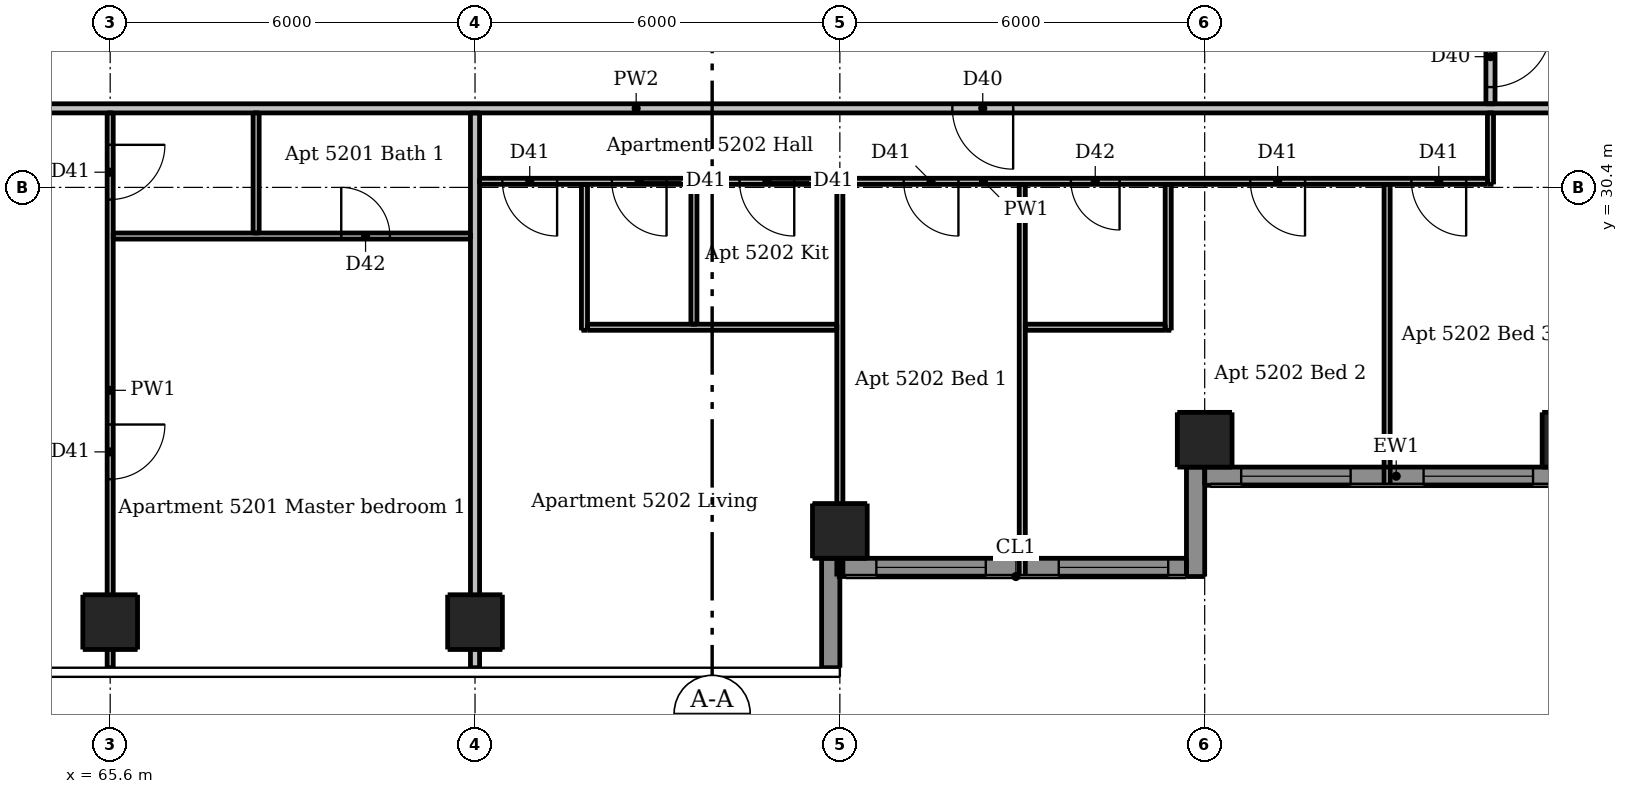
"""IFC4 building model, lengths in metres.
Left out: names, types, materials, properties, quantities, classifications, styles, units other than length and angle.
Written with IfcOpenShell. Run it as: python <this file> out.ifc"""

import sys

from ifc_helpers import new_model, si_unit, direction, frame, frame_2d, origin, origin_2d, place, context, subcontext, project, spatial, rectangle, extrude, element, fill, save


model = new_model("IFC4")
c1 = context("Model", 3, precision=1e-05, world=origin(), true_north=direction((0.0, 1.0)))
c2 = subcontext(c1, "Body", "Model", "MODEL_VIEW")
j1 = project(units=[si_unit("LENGTHUNIT", "METRE"), si_unit("PLANEANGLEUNIT", "RADIAN")], contexts=[c1])
p1 = place(None, origin())
s1 = spatial("IfcSite", under=j1, at=p1, CompositionType="ELEMENT")
p2 = place(p1, origin())
s2 = spatial("IfcBuilding", under=s1, at=p2, CompositionType="ELEMENT")
p3 = place(p2, frame((0.0, 0.0, 196.9)))
s3 = spatial("IfcBuildingStorey", under=s2, at=p3, CompositionType="ELEMENT", Elevation=196.9)
for number, where, z_axis, x_axis in (
    (1, (65.6, 23.25, 0.0), (0.0, 0.0, 1.0), (1.0, 0.0, 0.0)),
    (2, (71.6, 23.25, 0.0), (0.0, 0.0, 1.0), (1.0, 0.0, 0.0)),
    (3, (77.6, 24.75, 0.0), (0.0, 0.0, 1.0), (1.0, 0.0, 0.0)),
    (4, (83.6, 26.25, 0.0), (0.0, 0.0, 1.0), (1.0, 0.0, 0.0)),
    (5, (89.6, 26.25, 0.0), (0.0, 0.0, 1.0), (1.0, 0.0, 0.0)),
):
    element("IfcColumn", number, at=place(p3, frame(where, z_axis=z_axis, x_axis=x_axis)), inside=s3, PredefinedType="COLUMN", context=c2, shape_type="SweptSolid", body=[
        extrude(rectangle(XDim=0.9, YDim=0.9, at=origin_2d()), origin(), (0.0, 0.0, 1.0), 3.05),
    ])
for number, where, z_axis, x_axis in (
    (6, (77.45, 22.5, 0.0), (0.0, 0.0, 1.0), (0.0, 1.0, 0.0)),
    (7, (83.45, 24.0, 0.0), (0.0, 0.0, 1.0), (0.0, 1.0, 0.0)),
):
    element("IfcWall", number, at=place(p3, frame(where, z_axis=z_axis, x_axis=x_axis)), inside=s3, PredefinedType="SOLIDWALL", context=c2, shape_type="SweptSolid", body=[
        extrude(rectangle(XDim=1.8, YDim=0.3, at=frame_2d((0.9, 0.0))), origin(), (0.0, 0.0, 1.0), 3.05),
    ])
p4 = place(p3, frame((77.6, 24.15, 0.0), z_axis=(0.0, 0.0, 1.0), x_axis=(1.0, 0.0, 0.0)))
e8 = element("IfcWall", 8, at=p4, inside=s3, PredefinedType="SOLIDWALL", context=c2, shape_type="SweptSolid", body=[
    extrude(rectangle(XDim=5.7, YDim=0.3, at=frame_2d((2.85, 0.0))), origin(), (0.0, 0.0, 1.0), 3.05),
])
p5 = place(p4, frame((0.6, 0.0, 0.15)))
e9 = element("IfcOpeningElement", 9, at=p5, cuts=e8, PredefinedType="OPENING", context=c2, shape_type="SweptSolid", body=[
    extrude(rectangle(XDim=1.8, YDim=2.1, at=frame_2d((0.9, 1.05))), frame((0.0, 0.16, 0.0), z_axis=(0.0, -1.0, 0.0), x_axis=(1.0, 0.0, 0.0)), (0.0, 0.0, 1.0), 0.32),
])
p6 = place(p4, frame((3.6, 0.0, 0.15)))
e10 = element("IfcOpeningElement", 10, at=p6, cuts=e8, PredefinedType="OPENING", context=c2, shape_type="SweptSolid", body=[
    extrude(rectangle(XDim=1.8, YDim=2.1, at=frame_2d((0.9, 1.05))), frame((0.0, 0.16, 0.0), z_axis=(0.0, -1.0, 0.0), x_axis=(1.0, 0.0, 0.0)), (0.0, 0.0, 1.0), 0.32),
])
p7 = place(p3, frame((83.6, 25.65, 0.0), z_axis=(0.0, 0.0, 1.0), x_axis=(1.0, 0.0, 0.0)))
e11 = element("IfcWall", 11, at=p7, inside=s3, PredefinedType="SOLIDWALL", context=c2, shape_type="SweptSolid", body=[
    extrude(rectangle(XDim=6.3, YDim=0.3, at=frame_2d((3.15, 0.0))), origin(), (0.0, 0.0, 1.0), 3.05),
])
p8 = place(p7, frame((0.6, 0.0, 0.15)))
e12 = element("IfcOpeningElement", 12, at=p8, cuts=e11, PredefinedType="OPENING", context=c2, shape_type="SweptSolid", body=[
    extrude(rectangle(XDim=1.8, YDim=2.1, at=frame_2d((0.9, 1.05))), frame((0.0, 0.16, 0.0), z_axis=(0.0, -1.0, 0.0), x_axis=(1.0, 0.0, 0.0)), (0.0, 0.0, 1.0), 0.32),
])
p9 = place(p7, frame((3.6, 0.0, 0.15)))
e13 = element("IfcOpeningElement", 13, at=p9, cuts=e11, PredefinedType="OPENING", context=c2, shape_type="SweptSolid", body=[
    extrude(rectangle(XDim=1.8, YDim=2.1, at=frame_2d((0.9, 1.05))), frame((0.0, 0.16, 0.0), z_axis=(0.0, -1.0, 0.0), x_axis=(1.0, 0.0, 0.0)), (0.0, 0.0, 1.0), 0.32),
])
p10 = place(p3, frame((65.6, 31.625, 0.0), z_axis=(0.0, 0.0, 1.0), x_axis=(0.0, -1.0, 0.0)))
e14 = element("IfcWall", 14, at=p10, inside=s3, PredefinedType="PARTITIONING", context=c2, shape_type="SweptSolid", body=[
    extrude(rectangle(XDim=9.125, YDim=0.1, at=frame_2d((4.562, 0.0))), origin(), (0.0, 0.0, 1.0), 2.516),
])
p11 = place(p10, frame((0.525, 0.0, 0.0)))
e15 = element("IfcOpeningElement", 15, at=p11, cuts=e14, PredefinedType="OPENING", context=c2, shape_type="SweptSolid", body=[
    extrude(rectangle(XDim=0.9, YDim=2.1, at=frame_2d((0.45, 1.05))), frame((0.0, 0.06, 0.0), z_axis=(0.0, -1.0, 0.0), x_axis=(1.0, 0.0, 0.0)), (0.0, 0.0, 1.0), 0.12),
])
p12 = place(p10, frame((5.125, 0.0, 0.0)))
e16 = element("IfcOpeningElement", 16, at=p12, cuts=e14, PredefinedType="OPENING", context=c2, shape_type="SweptSolid", body=[
    extrude(rectangle(XDim=0.9, YDim=2.1, at=frame_2d((0.45, 1.05))), frame((0.0, 0.06, 0.0), z_axis=(0.0, -1.0, 0.0), x_axis=(1.0, 0.0, 0.0)), (0.0, 0.0, 1.0), 0.12),
])
p13 = place(p3, frame((68.0, 29.65, 0.0), z_axis=(0.0, 0.0, 1.0), x_axis=(0.0, 1.0, 0.0)))
e17 = element("IfcWall", 17, at=p13, inside=s3, PredefinedType="PARTITIONING", context=c2, shape_type="SweptSolid", body=[
    extrude(rectangle(XDim=1.975, YDim=0.1, at=frame_2d((0.988, 0.0))), origin(), (0.0, 0.0, 1.0), 3.05),
])
p14 = place(p3, frame((73.4, 28.05, 0.0), z_axis=(0.0, 0.0, 1.0), x_axis=(0.0, 1.0, 0.0)))
e18 = element("IfcWall", 18, at=p14, inside=s3, PredefinedType="PARTITIONING", context=c2, shape_type="SweptSolid", body=[
    extrude(rectangle(XDim=2.4, YDim=0.1, at=frame_2d((1.2, 0.0))), origin(), (0.0, 0.0, 1.0), 3.05),
])
p15 = place(p3, frame((75.2, 28.15, 0.0), z_axis=(0.0, 0.0, 1.0), x_axis=(0.0, 1.0, 0.0)))
e19 = element("IfcWall", 19, at=p15, inside=s3, PredefinedType="PARTITIONING", context=c2, shape_type="SweptSolid", body=[
    extrude(rectangle(XDim=2.3, YDim=0.1, at=frame_2d((1.15, 0.0))), origin(), (0.0, 0.0, 1.0), 3.05),
])
p16 = place(p3, frame((77.6, 24.0, 0.0), z_axis=(0.0, 0.0, 1.0), x_axis=(0.0, 1.0, 0.0)))
e20 = element("IfcWall", 20, at=p16, inside=s3, PredefinedType="PARTITIONING", context=c2, shape_type="SweptSolid", body=[
    extrude(rectangle(XDim=6.45, YDim=0.1, at=frame_2d((3.225, 0.0))), origin(), (0.0, 0.0, 1.0), 2.59),
])
p17 = place(p3, frame((80.6, 24.0, 0.0), z_axis=(0.0, 0.0, 1.0), x_axis=(0.0, 1.0, 0.0)))
e21 = element("IfcWall", 21, at=p17, inside=s3, PredefinedType="PARTITIONING", context=c2, shape_type="SweptSolid", body=[
    extrude(rectangle(XDim=6.45, YDim=0.1, at=frame_2d((3.225, 0.0))), origin(), (0.0, 0.0, 1.0), 3.05),
])
p18 = place(p3, frame((83.0, 28.05, 0.0), z_axis=(0.0, 0.0, 1.0), x_axis=(0.0, 1.0, 0.0)))
e22 = element("IfcWall", 22, at=p18, inside=s3, PredefinedType="PARTITIONING", context=c2, shape_type="SweptSolid", body=[
    extrude(rectangle(XDim=2.4, YDim=0.1, at=frame_2d((1.2, 0.0))), origin(), (0.0, 0.0, 1.0), 3.05),
])
p19 = place(p3, frame((86.6, 25.5, 0.0), z_axis=(0.0, 0.0, 1.0), x_axis=(0.0, 1.0, 0.0)))
e23 = element("IfcWall", 23, at=p19, inside=s3, PredefinedType="PARTITIONING", context=c2, shape_type="SweptSolid", body=[
    extrude(rectangle(XDim=4.95, YDim=0.1, at=frame_2d((2.475, 0.0))), origin(), (0.0, 0.0, 1.0), 3.05),
])
p20 = place(p3, frame((88.3, 30.45, 0.0), z_axis=(0.0, 0.0, 1.0), x_axis=(0.0, 1.0, 0.0)))
e24 = element("IfcWall", 24, at=p20, inside=s3, PredefinedType="PARTITIONING", context=c2, shape_type="SweptSolid", body=[
    extrude(rectangle(XDim=1.175, YDim=0.1, at=frame_2d((0.587, 0.0))), origin(), (0.0, 0.0, 1.0), 3.05),
])
p21 = place(p3, frame((88.25, 30.5, 0.0), z_axis=(0.0, 0.0, 1.0), x_axis=(-1.0, 0.0, 0.0)))
e25 = element("IfcWall", 25, at=p21, inside=s3, PredefinedType="PARTITIONING", context=c2, shape_type="SweptSolid", body=[
    extrude(rectangle(XDim=16.575, YDim=0.1, at=frame_2d((8.288, 0.0))), origin(), (0.0, 0.0, 1.0), 3.05),
])
p22 = place(p21, frame((15.3, 0.0, 0.0)))
e26 = element("IfcOpeningElement", 26, at=p22, cuts=e25, PredefinedType="OPENING", context=c2, shape_type="SweptSolid", body=[
    extrude(rectangle(XDim=0.9, YDim=2.1, at=frame_2d((0.45, 1.05))), frame((0.0, 0.06, 0.0), z_axis=(0.0, -1.0, 0.0), x_axis=(1.0, 0.0, 0.0)), (0.0, 0.0, 1.0), 0.12),
])
p23 = place(p21, frame((11.4, 0.0, 0.0)))
e27 = element("IfcOpeningElement", 27, at=p23, cuts=e25, PredefinedType="OPENING", context=c2, shape_type="SweptSolid", body=[
    extrude(rectangle(XDim=0.9, YDim=2.1, at=frame_2d((0.45, 1.05))), frame((0.0, 0.06, 0.0), z_axis=(0.0, -1.0, 0.0), x_axis=(1.0, 0.0, 0.0)), (0.0, 0.0, 1.0), 0.12),
])
p24 = place(p21, frame((13.5, 0.0, 0.0)))
e28 = element("IfcOpeningElement", 28, at=p24, cuts=e25, PredefinedType="OPENING", context=c2, shape_type="SweptSolid", body=[
    extrude(rectangle(XDim=0.9, YDim=2.1, at=frame_2d((0.45, 1.05))), frame((0.0, 0.06, 0.0), z_axis=(0.0, -1.0, 0.0), x_axis=(1.0, 0.0, 0.0)), (0.0, 0.0, 1.0), 0.12),
])
p25 = place(p21, frame((8.7, 0.0, 0.0)))
e29 = element("IfcOpeningElement", 29, at=p25, cuts=e25, PredefinedType="OPENING", context=c2, shape_type="SweptSolid", body=[
    extrude(rectangle(XDim=0.9, YDim=2.1, at=frame_2d((0.45, 1.05))), frame((0.0, 0.06, 0.0), z_axis=(0.0, -1.0, 0.0), x_axis=(1.0, 0.0, 0.0)), (0.0, 0.0, 1.0), 0.12),
])
p26 = place(p21, frame((3.0, 0.0, 0.0)))
e30 = element("IfcOpeningElement", 30, at=p26, cuts=e25, PredefinedType="OPENING", context=c2, shape_type="SweptSolid", body=[
    extrude(rectangle(XDim=0.9, YDim=2.1, at=frame_2d((0.45, 1.05))), frame((0.0, 0.06, 0.0), z_axis=(0.0, -1.0, 0.0), x_axis=(1.0, 0.0, 0.0)), (0.0, 0.0, 1.0), 0.12),
])
p27 = place(p21, frame((0.35, 0.0, 0.0)))
e31 = element("IfcOpeningElement", 31, at=p27, cuts=e25, PredefinedType="OPENING", context=c2, shape_type="SweptSolid", body=[
    extrude(rectangle(XDim=0.9, YDim=2.1, at=frame_2d((0.45, 1.05))), frame((0.0, 0.06, 0.0), z_axis=(0.0, -1.0, 0.0), x_axis=(1.0, 0.0, 0.0)), (0.0, 0.0, 1.0), 0.12),
])
p28 = place(p21, frame((6.05, 0.0, 0.0)))
e32 = element("IfcOpeningElement", 32, at=p28, cuts=e25, PredefinedType="OPENING", context=c2, shape_type="SweptSolid", body=[
    extrude(rectangle(XDim=0.8, YDim=2.1, at=frame_2d((0.4, 1.05))), frame((0.0, 0.06, 0.0), z_axis=(0.0, -1.0, 0.0), x_axis=(1.0, 0.0, 0.0)), (0.0, 0.0, 1.0), 0.12),
])
p29 = place(p3, frame((65.65, 29.6, 0.0), z_axis=(0.0, 0.0, 1.0), x_axis=(1.0, 0.0, 0.0)))
e33 = element("IfcWall", 33, at=p29, inside=s3, PredefinedType="PARTITIONING", context=c2, shape_type="SweptSolid", body=[
    extrude(rectangle(XDim=5.875, YDim=0.1, at=frame_2d((2.938, 0.0))), origin(), (0.0, 0.0, 1.0), 3.05),
])
p30 = place(p29, frame((3.75, 0.0, 0.0)))
e34 = element("IfcOpeningElement", 34, at=p30, cuts=e33, PredefinedType="OPENING", context=c2, shape_type="SweptSolid", body=[
    extrude(rectangle(XDim=0.8, YDim=2.1, at=frame_2d((0.4, 1.05))), frame((0.0, 0.06, 0.0), z_axis=(0.0, -1.0, 0.0), x_axis=(1.0, 0.0, 0.0)), (0.0, 0.0, 1.0), 0.12),
])
p31 = place(p3, frame((73.45, 28.1, 0.0), z_axis=(0.0, 0.0, 1.0), x_axis=(1.0, 0.0, 0.0)))
e35 = element("IfcWall", 35, at=p31, inside=s3, PredefinedType="PARTITIONING", context=c2, shape_type="SweptSolid", body=[
    extrude(rectangle(XDim=4.1, YDim=0.1, at=frame_2d((2.05, 0.0))), origin(), (0.0, 0.0, 1.0), 3.05),
])
p32 = place(p3, frame((80.65, 28.1, 0.0), z_axis=(0.0, 0.0, 1.0), x_axis=(1.0, 0.0, 0.0)))
e36 = element("IfcWall", 36, at=p32, inside=s3, PredefinedType="PARTITIONING", context=c2, shape_type="SweptSolid", body=[
    extrude(rectangle(XDim=2.3, YDim=0.1, at=frame_2d((1.15, 0.0))), origin(), (0.0, 0.0, 1.0), 3.05),
])
p33 = place(p3, frame((71.6, 22.5, 0.0), z_axis=(0.0, 0.0, 1.0), x_axis=(0.0, 1.0, 0.0)))
e37 = element("IfcWall", 37, at=p33, inside=s3, PredefinedType="PARTITIONING", context=c2, shape_type="SweptSolid", body=[
    extrude(rectangle(XDim=9.125, YDim=0.15, at=frame_2d((4.562, 0.0))), origin(), (0.0, 0.0, 1.0), 2.516),
])
p34 = place(p3, frame((88.3, 61.175, 0.0), z_axis=(0.0, 0.0, 1.0), x_axis=(0.0, -1.0, 0.0)))
e38 = element("IfcWall", 38, at=p34, inside=s3, PredefinedType="PARTITIONING", context=c2, shape_type="SweptSolid", body=[
    extrude(rectangle(XDim=29.4, YDim=0.15, at=frame_2d((14.7, 0.0))), origin(), (0.0, 0.0, 1.0), 3.05),
])
p35 = place(p34, frame((28.125, 0.0, 0.0)))
e39 = element("IfcOpeningElement", 39, at=p35, cuts=e38, PredefinedType="OPENING", context=c2, shape_type="SweptSolid", body=[
    extrude(rectangle(XDim=1.0, YDim=2.1, at=frame_2d((0.5, 1.05))), frame((0.0, 0.085, 0.0), z_axis=(0.0, -1.0, 0.0), x_axis=(1.0, 0.0, 0.0)), (0.0, 0.0, 1.0), 0.17),
])
p36 = place(p34, frame((10.775, 0.0, 0.0)))
e40 = element("IfcOpeningElement", 40, at=p36, cuts=e38, PredefinedType="OPENING", context=c2, shape_type="SweptSolid", body=[
    extrude(rectangle(XDim=1.0, YDim=2.1, at=frame_2d((0.5, 1.05))), frame((0.0, 0.085, 0.0), z_axis=(0.0, -1.0, 0.0), x_axis=(1.0, 0.0, 0.0)), (0.0, 0.0, 1.0), 0.17),
])
p37 = place(p3, frame((89.525, 31.7, 0.0), z_axis=(0.0, 0.0, 1.0), x_axis=(-1.0, 0.0, 0.0)))
e41 = element("IfcWall", 41, at=p37, inside=s3, PredefinedType="PARTITIONING", context=c2, shape_type="SweptSolid", body=[
    extrude(rectangle(XDim=30.55, YDim=0.15, at=frame_2d((15.275, 0.0))), origin(), (0.0, 0.0, 1.0), 3.05),
])
p38 = place(p37, frame((26.775, 0.0, 0.0)))
e42 = element("IfcOpeningElement", 42, at=p38, cuts=e41, PredefinedType="OPENING", context=c2, shape_type="SweptSolid", body=[
    extrude(rectangle(XDim=1.0, YDim=2.1, at=frame_2d((0.5, 1.05))), frame((0.0, 0.085, 0.0), z_axis=(0.0, -1.0, 0.0), x_axis=(1.0, 0.0, 0.0)), (0.0, 0.0, 1.0), 0.17),
])
p39 = place(p37, frame((9.075, 0.0, 0.0)))
e43 = element("IfcOpeningElement", 43, at=p39, cuts=e41, PredefinedType="OPENING", context=c2, shape_type="SweptSolid", body=[
    extrude(rectangle(XDim=1.0, YDim=2.1, at=frame_2d((0.5, 1.05))), frame((0.0, 0.085, 0.0), z_axis=(0.0, -1.0, 0.0), x_axis=(1.0, 0.0, 0.0)), (0.0, 0.0, 1.0), 0.17),
])
p40 = place(p5, origin())
e44 = element("IfcWindow", 44, at=p40, inside=s3, PartitioningType="DOUBLE_PANEL_VERTICAL", PredefinedType="WINDOW", context=c2, shape_type="SweptSolid", body=[
    extrude(rectangle(XDim=1.8, YDim=2.1, at=frame_2d((0.9, 1.05))), frame((0.0, 0.03, 0.0), z_axis=(0.0, -1.0, 0.0), x_axis=(1.0, 0.0, 0.0)), (0.0, 0.0, 1.0), 0.06),
])
fill(e9, e44)
p41 = place(p6, origin())
e45 = element("IfcWindow", 45, at=p41, inside=s3, PartitioningType="DOUBLE_PANEL_VERTICAL", PredefinedType="WINDOW", context=c2, shape_type="SweptSolid", body=[
    extrude(rectangle(XDim=1.8, YDim=2.1, at=frame_2d((0.9, 1.05))), frame((0.0, 0.03, 0.0), z_axis=(0.0, -1.0, 0.0), x_axis=(1.0, 0.0, 0.0)), (0.0, 0.0, 1.0), 0.06),
])
fill(e10, e45)
p42 = place(p8, origin())
e46 = element("IfcWindow", 46, at=p42, inside=s3, PartitioningType="DOUBLE_PANEL_VERTICAL", PredefinedType="WINDOW", context=c2, shape_type="SweptSolid", body=[
    extrude(rectangle(XDim=1.8, YDim=2.1, at=frame_2d((0.9, 1.05))), frame((0.0, 0.03, 0.0), z_axis=(0.0, -1.0, 0.0), x_axis=(1.0, 0.0, 0.0)), (0.0, 0.0, 1.0), 0.06),
])
fill(e12, e46)
p43 = place(p9, origin())
e47 = element("IfcWindow", 47, at=p43, inside=s3, PartitioningType="DOUBLE_PANEL_VERTICAL", PredefinedType="WINDOW", context=c2, shape_type="SweptSolid", body=[
    extrude(rectangle(XDim=1.8, YDim=2.1, at=frame_2d((0.9, 1.05))), frame((0.0, 0.03, 0.0), z_axis=(0.0, -1.0, 0.0), x_axis=(1.0, 0.0, 0.0)), (0.0, 0.0, 1.0), 0.06),
])
fill(e13, e47)
p44 = place(p11, origin())
e48 = element("IfcDoor", 48, at=p44, inside=s3, OperationType="SINGLE_SWING_LEFT", PredefinedType="DOOR", context=c2, shape_type="SweptSolid", body=[
    extrude(rectangle(XDim=0.9, YDim=2.1, at=frame_2d((0.45, 1.05))), frame((0.0, 0.025, 0.0), z_axis=(0.0, -1.0, 0.0), x_axis=(1.0, 0.0, 0.0)), (0.0, 0.0, 1.0), 0.05),
])
fill(e15, e48)
p45 = place(p12, origin())
e49 = element("IfcDoor", 49, at=p45, inside=s3, OperationType="SINGLE_SWING_LEFT", PredefinedType="DOOR", context=c2, shape_type="SweptSolid", body=[
    extrude(rectangle(XDim=0.9, YDim=2.1, at=frame_2d((0.45, 1.05))), frame((0.0, 0.025, 0.0), z_axis=(0.0, -1.0, 0.0), x_axis=(1.0, 0.0, 0.0)), (0.0, 0.0, 1.0), 0.05),
])
fill(e16, e49)
p46 = place(p30, origin())
e50 = element("IfcDoor", 50, at=p46, inside=s3, OperationType="SINGLE_SWING_LEFT", PredefinedType="DOOR", context=c2, shape_type="SweptSolid", body=[
    extrude(rectangle(XDim=0.8, YDim=2.1, at=frame_2d((0.4, 1.05))), frame((0.0, 0.025, 0.0), z_axis=(0.0, -1.0, 0.0), x_axis=(1.0, 0.0, 0.0)), (0.0, 0.0, 1.0), 0.05),
])
fill(e34, e50)
p47 = place(p39, origin())
e51 = element("IfcDoor", 51, at=p47, inside=s3, OperationType="SINGLE_SWING_LEFT", PredefinedType="DOOR", context=c2, shape_type="SweptSolid", body=[
    extrude(rectangle(XDim=1.0, YDim=2.1, at=frame_2d((0.5, 1.05))), frame((0.0, 0.025, 0.0), z_axis=(0.0, -1.0, 0.0), x_axis=(1.0, 0.0, 0.0)), (0.0, 0.0, 1.0), 0.05),
])
fill(e43, e51)
p48 = place(p22, origin())
e52 = element("IfcDoor", 52, at=p48, inside=s3, OperationType="SINGLE_SWING_LEFT", PredefinedType="DOOR", context=c2, shape_type="SweptSolid", body=[
    extrude(rectangle(XDim=0.9, YDim=2.1, at=frame_2d((0.45, 1.05))), frame((0.0, 0.025, 0.0), z_axis=(0.0, -1.0, 0.0), x_axis=(1.0, 0.0, 0.0)), (0.0, 0.0, 1.0), 0.05),
])
fill(e26, e52)
p49 = place(p23, origin())
e53 = element("IfcDoor", 53, at=p49, inside=s3, OperationType="SINGLE_SWING_LEFT", PredefinedType="DOOR", context=c2, shape_type="SweptSolid", body=[
    extrude(rectangle(XDim=0.9, YDim=2.1, at=frame_2d((0.45, 1.05))), frame((0.0, 0.025, 0.0), z_axis=(0.0, -1.0, 0.0), x_axis=(1.0, 0.0, 0.0)), (0.0, 0.0, 1.0), 0.05),
])
fill(e27, e53)
p50 = place(p24, origin())
e54 = element("IfcDoor", 54, at=p50, inside=s3, OperationType="SINGLE_SWING_LEFT", PredefinedType="DOOR", context=c2, shape_type="SweptSolid", body=[
    extrude(rectangle(XDim=0.9, YDim=2.1, at=frame_2d((0.45, 1.05))), frame((0.0, 0.025, 0.0), z_axis=(0.0, -1.0, 0.0), x_axis=(1.0, 0.0, 0.0)), (0.0, 0.0, 1.0), 0.05),
])
fill(e28, e54)
p51 = place(p25, origin())
e55 = element("IfcDoor", 55, at=p51, inside=s3, OperationType="SINGLE_SWING_LEFT", PredefinedType="DOOR", context=c2, shape_type="SweptSolid", body=[
    extrude(rectangle(XDim=0.9, YDim=2.1, at=frame_2d((0.45, 1.05))), frame((0.0, 0.025, 0.0), z_axis=(0.0, -1.0, 0.0), x_axis=(1.0, 0.0, 0.0)), (0.0, 0.0, 1.0), 0.05),
])
fill(e29, e55)
p52 = place(p26, origin())
e56 = element("IfcDoor", 56, at=p52, inside=s3, OperationType="SINGLE_SWING_LEFT", PredefinedType="DOOR", context=c2, shape_type="SweptSolid", body=[
    extrude(rectangle(XDim=0.9, YDim=2.1, at=frame_2d((0.45, 1.05))), frame((0.0, 0.025, 0.0), z_axis=(0.0, -1.0, 0.0), x_axis=(1.0, 0.0, 0.0)), (0.0, 0.0, 1.0), 0.05),
])
fill(e30, e56)
p53 = place(p27, origin())
e57 = element("IfcDoor", 57, at=p53, inside=s3, OperationType="SINGLE_SWING_LEFT", PredefinedType="DOOR", context=c2, shape_type="SweptSolid", body=[
    extrude(rectangle(XDim=0.9, YDim=2.1, at=frame_2d((0.45, 1.05))), frame((0.0, 0.025, 0.0), z_axis=(0.0, -1.0, 0.0), x_axis=(1.0, 0.0, 0.0)), (0.0, 0.0, 1.0), 0.05),
])
fill(e31, e57)
p54 = place(p28, origin())
e58 = element("IfcDoor", 58, at=p54, inside=s3, OperationType="SINGLE_SWING_LEFT", PredefinedType="DOOR", context=c2, shape_type="SweptSolid", body=[
    extrude(rectangle(XDim=0.8, YDim=2.1, at=frame_2d((0.4, 1.05))), frame((0.0, 0.025, 0.0), z_axis=(0.0, -1.0, 0.0), x_axis=(1.0, 0.0, 0.0)), (0.0, 0.0, 1.0), 0.05),
])
fill(e32, e58)
p55 = place(p35, origin())
e59 = element("IfcDoor", 59, at=p55, inside=s3, OperationType="SINGLE_SWING_LEFT", PredefinedType="DOOR", context=c2, shape_type="SweptSolid", body=[
    extrude(rectangle(XDim=1.0, YDim=2.1, at=frame_2d((0.5, 1.05))), frame((0.0, 0.025, 0.0), z_axis=(0.0, -1.0, 0.0), x_axis=(1.0, 0.0, 0.0)), (0.0, 0.0, 1.0), 0.05),
])
fill(e39, e59)
save(model, sys.argv[1])
